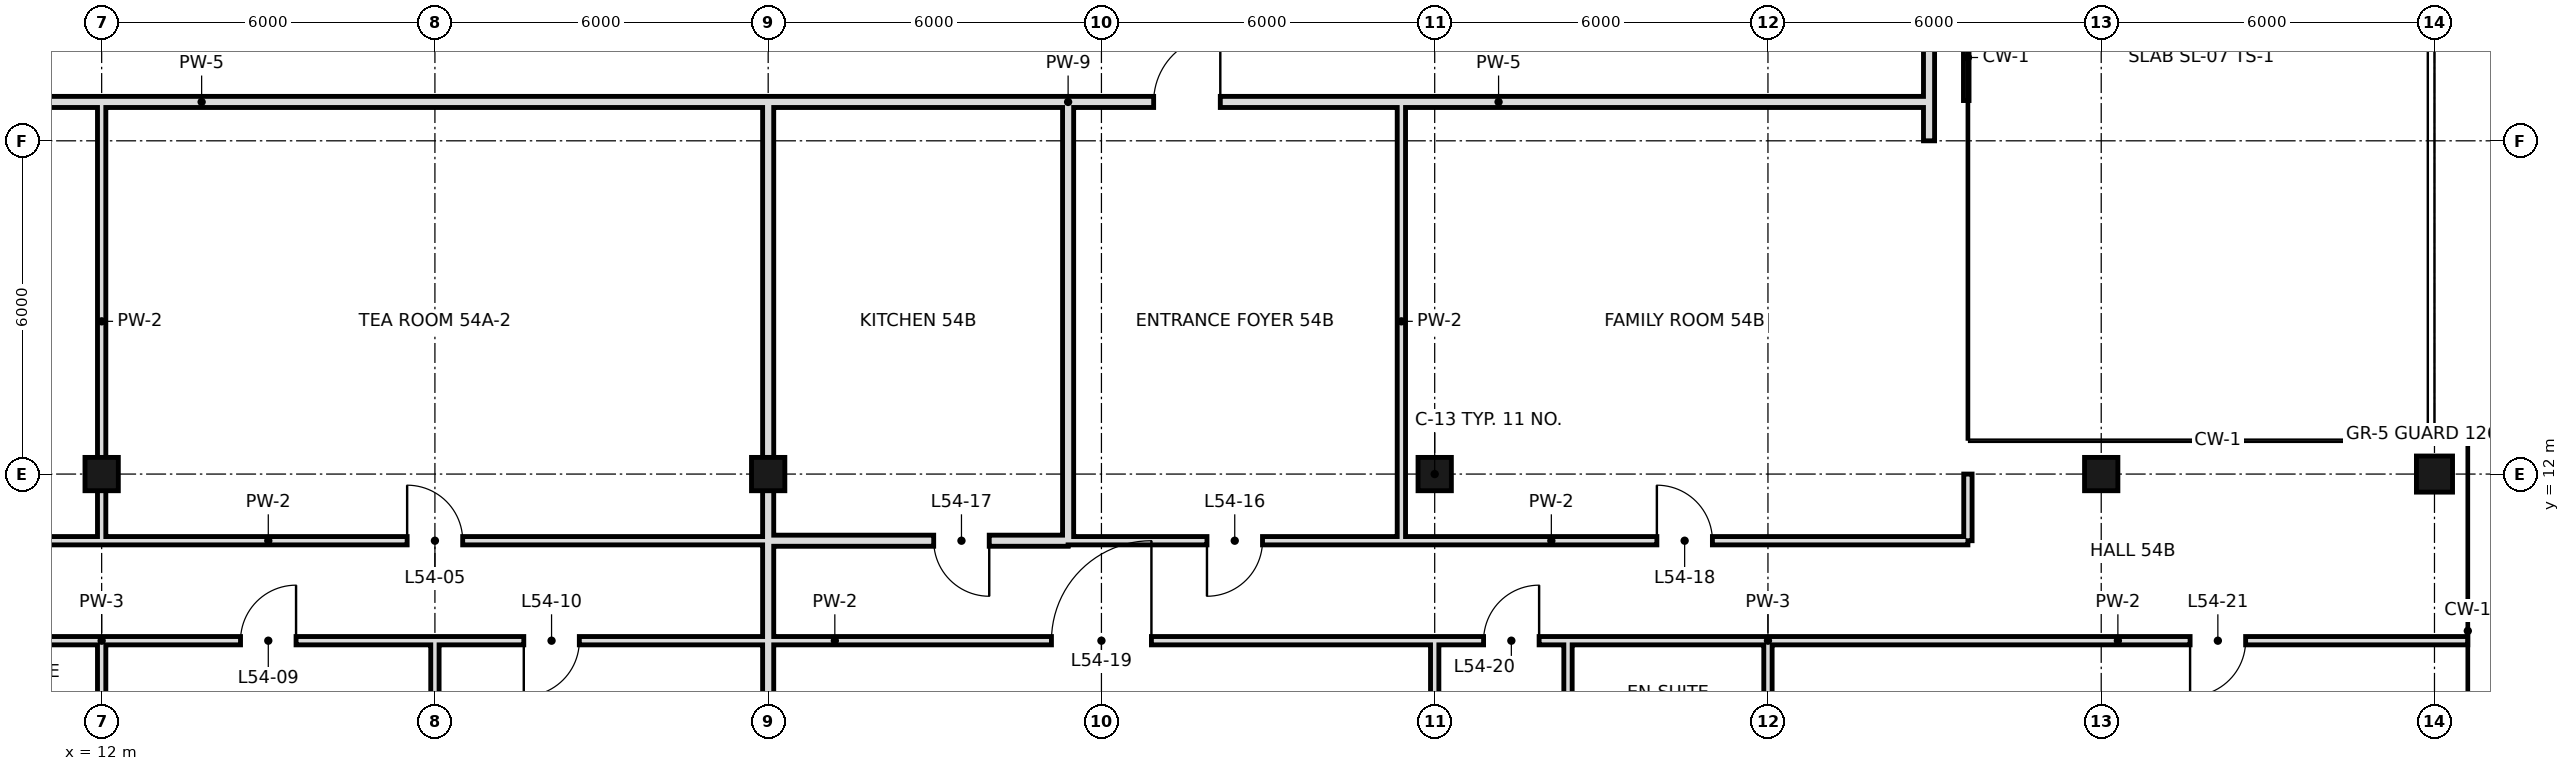
"""IFC4 building model, lengths in metres.
Left out: names, types, materials, properties, quantities, classifications, styles, units other than length and angle.
Written with IfcOpenShell. Run it as: python <this file> out.ifc"""

import sys

from ifc_helpers import new_model, si_unit, direction, frame, frame_2d, origin, origin_2d, place, context, subcontext, project, spatial, rectangle, hollow_rectangle, extrude, element, fill, save


model = new_model("IFC4")
c1 = context("Model", 3, precision=1e-05, world=origin(), true_north=direction((0.0, 1.0)))
c2 = subcontext(c1, "Body", "Model", "MODEL_VIEW")
j1 = project(units=[si_unit("LENGTHUNIT", "METRE"), si_unit("PLANEANGLEUNIT", "RADIAN")], contexts=[c1])
p1 = place(None, origin())
s1 = spatial("IfcSite", under=j1, at=p1, CompositionType="ELEMENT")
p2 = place(p1, origin())
s2 = spatial("IfcBuilding", under=s1, at=p2, CompositionType="ELEMENT")
p3 = place(p2, frame((0.0, 0.0, 229.8)))
s3 = spatial("IfcBuildingStorey", under=s2, at=p3, CompositionType="ELEMENT", Elevation=229.8)
for number, where, z_axis, x_axis in (
    (1, (12.0, 12.0, 0.0), (0.0, 0.0, 1.0), (1.0, 0.0, 0.0)),
    (2, (24.0, 12.0, 0.0), (0.0, 0.0, 1.0), (1.0, 0.0, 0.0)),
    (3, (36.0, 12.0, 0.0), (0.0, 0.0, 1.0), (1.0, 0.0, 0.0)),
    (4, (48.0, 12.0, 0.0), (0.0, 0.0, 1.0), (1.0, 0.0, 0.0)),
):
    element("IfcColumn", number, at=place(p3, frame(where, z_axis=z_axis, x_axis=x_axis)), inside=s3, PredefinedType="COLUMN", context=c2, shape_type="SweptSolid", body=[
        extrude(hollow_rectangle(XDim=0.6, YDim=0.6, WallThickness=0.028, at=origin_2d()), origin(), (0.0, 0.0, 1.0), 4.4),
    ])
p4 = place(p3, frame((54.0, 12.0, 0.0), z_axis=(0.0, 0.0, 1.0), x_axis=(1.0, 0.0, 0.0)))
e5 = element("IfcColumn", 5, at=p4, inside=s3, PredefinedType="COLUMN", context=c2, shape_type="SweptSolid", body=[
    extrude(hollow_rectangle(XDim=0.65, YDim=0.65, WallThickness=0.032, at=origin_2d()), origin(), (0.0, 0.0, 1.0), 4.4),
])
p5 = place(p3, frame((45.57, 18.725, 0.0), z_axis=(0.0, 0.0, 1.0), x_axis=(0.0, 1.0, 0.0)))
e6 = element("IfcWall", 6, at=p5, inside=s3, PredefinedType="SOLIDWALL", context=c2, shape_type="SweptSolid", body=[
    extrude(rectangle(XDim=7.625, YDim=0.1, at=frame_2d((3.812, 0.0))), origin(), (0.0, 0.0, 1.0), 4.1),
])
p6 = place(p5, frame((4.675, 0.0, 0.0)))
e7 = element("IfcOpeningElement", 7, at=p6, cuts=e6, PredefinedType="OPENING", context=c2, shape_type="SweptSolid", body=[
    extrude(rectangle(XDim=2.4, YDim=2.4, at=frame_2d((1.2, 1.2))), frame((0.0, 0.06, 0.0), z_axis=(0.0, -1.0, 0.0), x_axis=(1.0, 0.0, 0.0)), (0.0, 0.0, 1.0), 0.12),
])
p7 = place(p3, frame((12.0, 10.8, 0.0), z_axis=(0.0, 0.0, 1.0), x_axis=(0.0, 1.0, 0.0)))
e8 = element("IfcWall", 8, at=p7, inside=s3, PredefinedType="PARTITIONING", context=c2, shape_type="SweptSolid", body=[
    extrude(rectangle(XDim=7.9, YDim=0.15, at=frame_2d((3.95, 0.0))), origin(), (0.0, 0.0, 1.0), 3.4),
])
p8 = place(p3, frame((12.0, 6.0, 0.0), z_axis=(0.0, 0.0, 1.0), x_axis=(0.0, 1.0, 0.0)))
e9 = element("IfcWall", 9, at=p8, inside=s3, PredefinedType="PARTITIONING", context=c2, shape_type="SweptSolid", body=[
    extrude(rectangle(XDim=3.0, YDim=0.15, at=frame_2d((1.5, 0.0))), origin(), (0.0, 0.0, 1.0), 3.4),
])
p9 = place(p3, frame((18.0, -0.6, 0.0), z_axis=(0.0, 0.0, 1.0), x_axis=(0.0, 1.0, 0.0)))
e10 = element("IfcWall", 10, at=p9, inside=s3, PredefinedType="PARTITIONING", context=c2, shape_type="SweptSolid", body=[
    extrude(rectangle(XDim=9.6, YDim=0.15, at=frame_2d((4.8, 0.0))), origin(), (0.0, 0.0, 1.0), 3.4),
])
p10 = place(p3, frame((24.0, 10.8, 0.0), z_axis=(0.0, 0.0, 1.0), x_axis=(0.0, 1.0, 0.0)))
e11 = element("IfcWall", 11, at=p10, inside=s3, PredefinedType="SOLIDWALL", context=c2, shape_type="SweptSolid", body=[
    extrude(rectangle(XDim=7.9, YDim=0.2, at=frame_2d((3.95, 0.0))), origin(), (0.0, 0.0, 1.0), 3.4),
])
p11 = place(p3, frame((24.0, 0.0, 0.0), z_axis=(0.0, 0.0, 1.0), x_axis=(0.0, 1.0, 0.0)))
e12 = element("IfcWall", 12, at=p11, inside=s3, PredefinedType="SOLIDWALL", context=c2, shape_type="SweptSolid", body=[
    extrude(rectangle(XDim=10.8, YDim=0.2, at=frame_2d((5.4, 0.0))), origin(), (0.0, 0.0, 1.0), 3.4),
])
p12 = place(p3, frame((29.4, 10.8, 0.0), z_axis=(0.0, 0.0, 1.0), x_axis=(0.0, 1.0, 0.0)))
e13 = element("IfcWall", 13, at=p12, inside=s3, PredefinedType="SOLIDWALL", context=c2, shape_type="SweptSolid", body=[
    extrude(rectangle(XDim=7.9, YDim=0.2, at=frame_2d((3.95, 0.0))), origin(), (0.0, 0.0, 1.0), 3.4),
])
p13 = place(p3, frame((35.4, 10.8, 0.0), z_axis=(0.0, 0.0, 1.0), x_axis=(0.0, 1.0, 0.0)))
e14 = element("IfcWall", 14, at=p13, inside=s3, PredefinedType="PARTITIONING", context=c2, shape_type="SweptSolid", body=[
    extrude(rectangle(XDim=7.9, YDim=0.15, at=frame_2d((3.95, 0.0))), origin(), (0.0, 0.0, 1.0), 4.1),
])
p14 = place(p3, frame((36.0, 0.0, 0.0), z_axis=(0.0, 0.0, 1.0), x_axis=(0.0, 1.0, 0.0)))
e15 = element("IfcWall", 15, at=p14, inside=s3, PredefinedType="PARTITIONING", context=c2, shape_type="SweptSolid", body=[
    extrude(rectangle(XDim=9.0, YDim=0.15, at=frame_2d((4.5, 0.0))), origin(), (0.0, 0.0, 1.0), 3.4),
])
p15 = place(p3, frame((38.4, 6.0, 0.0), z_axis=(0.0, 0.0, 1.0), x_axis=(0.0, 1.0, 0.0)))
e16 = element("IfcWall", 16, at=p15, inside=s3, PredefinedType="PARTITIONING", context=c2, shape_type="SweptSolid", body=[
    extrude(rectangle(XDim=3.0, YDim=0.15, at=frame_2d((1.5, 0.0))), origin(), (0.0, 0.0, 1.0), 4.1),
])
p16 = place(p3, frame((42.0, 6.0, 0.0), z_axis=(0.0, 0.0, 1.0), x_axis=(0.0, 1.0, 0.0)))
e17 = element("IfcWall", 17, at=p16, inside=s3, PredefinedType="PARTITIONING", context=c2, shape_type="SweptSolid", body=[
    extrude(rectangle(XDim=3.0, YDim=0.15, at=frame_2d((1.5, 0.0))), origin(), (0.0, 0.0, 1.0), 3.4),
])
p17 = place(p3, frame((44.9, 18.0, 0.0), z_axis=(0.0, 0.0, 1.0), x_axis=(0.0, 1.0, 0.0)))
e18 = element("IfcWall", 18, at=p17, inside=s3, PredefinedType="SOLIDWALL", context=c2, shape_type="SweptSolid", body=[
    extrude(rectangle(XDim=30.6, YDim=0.2, at=frame_2d((15.3, 0.0))), origin(), (0.0, 0.0, 1.0), 3.4),
])
p18 = place(p17, frame((20.27, 0.0, 0.0)))
e19 = element("IfcOpeningElement", 19, at=p18, cuts=e18, PredefinedType="OPENING", context=c2, shape_type="SweptSolid", body=[
    extrude(rectangle(XDim=1.2, YDim=2.4, at=frame_2d((0.6, 1.2))), frame((0.0, 0.11, 0.0), z_axis=(0.0, -1.0, 0.0), x_axis=(1.0, 0.0, 0.0)), (0.0, 0.0, 1.0), 0.22),
])
p19 = place(p3, frame((45.6, 10.8, 0.0), z_axis=(0.0, 0.0, 1.0), x_axis=(0.0, 1.0, 0.0)))
e20 = element("IfcWall", 20, at=p19, inside=s3, PredefinedType="PARTITIONING", context=c2, shape_type="SweptSolid", body=[
    extrude(rectangle(XDim=1.2, YDim=0.15, at=frame_2d((0.6, 0.0))), origin(), (0.0, 0.0, 1.0), 4.1),
])
p20 = place(p3, frame((24.0, 10.8, 0.0), z_axis=(0.0, 0.0, 1.0), x_axis=(1.0, 0.0, 0.0)))
e21 = element("IfcWall", 21, at=p20, inside=s3, PredefinedType="SOLIDWALL", context=c2, shape_type="SweptSolid", body=[
    extrude(rectangle(XDim=5.4, YDim=0.2, at=frame_2d((2.7, 0.0))), origin(), (0.0, 0.0, 1.0), 3.4),
])
p21 = place(p20, frame((2.98, 0.0, 0.0)))
e22 = element("IfcOpeningElement", 22, at=p21, cuts=e21, PredefinedType="OPENING", context=c2, shape_type="SweptSolid", body=[
    extrude(rectangle(XDim=1.0, YDim=2.4, at=frame_2d((0.5, 1.2))), frame((0.0, 0.11, 0.0), z_axis=(0.0, -1.0, 0.0), x_axis=(1.0, 0.0, 0.0)), (0.0, 0.0, 1.0), 0.22),
])
p22 = place(p3, frame((6.0, 10.8, 0.0), z_axis=(0.0, 0.0, 1.0), x_axis=(1.0, 0.0, 0.0)))
e23 = element("IfcWall", 23, at=p22, inside=s3, PredefinedType="PARTITIONING", context=c2, shape_type="SweptSolid", body=[
    extrude(rectangle(XDim=18.0, YDim=0.15, at=frame_2d((9.0, 0.0))), origin(), (0.0, 0.0, 1.0), 4.1),
])
p23 = place(p22, frame((2.5, 0.0, 0.0)))
e24 = element("IfcOpeningElement", 24, at=p23, cuts=e23, PredefinedType="OPENING", context=c2, shape_type="SweptSolid", body=[
    extrude(rectangle(XDim=1.0, YDim=2.4, at=frame_2d((0.5, 1.2))), frame((0.0, 0.085, 0.0), z_axis=(0.0, -1.0, 0.0), x_axis=(1.0, 0.0, 0.0)), (0.0, 0.0, 1.0), 0.17),
])
p24 = place(p22, frame((11.5, 0.0, 0.0)))
e25 = element("IfcOpeningElement", 25, at=p24, cuts=e23, PredefinedType="OPENING", context=c2, shape_type="SweptSolid", body=[
    extrude(rectangle(XDim=1.0, YDim=2.4, at=frame_2d((0.5, 1.2))), frame((0.0, 0.085, 0.0), z_axis=(0.0, -1.0, 0.0), x_axis=(1.0, 0.0, 0.0)), (0.0, 0.0, 1.0), 0.17),
])
p25 = place(p3, frame((29.4, 10.8, 0.0), z_axis=(0.0, 0.0, 1.0), x_axis=(1.0, 0.0, 0.0)))
e26 = element("IfcWall", 26, at=p25, inside=s3, PredefinedType="PARTITIONING", context=c2, shape_type="SweptSolid", body=[
    extrude(rectangle(XDim=16.2, YDim=0.15, at=frame_2d((8.1, 0.0))), origin(), (0.0, 0.0, 1.0), 4.1),
])
p26 = place(p25, frame((2.5, 0.0, 0.0)))
e27 = element("IfcOpeningElement", 27, at=p26, cuts=e26, PredefinedType="OPENING", context=c2, shape_type="SweptSolid", body=[
    extrude(rectangle(XDim=1.0, YDim=2.4, at=frame_2d((0.5, 1.2))), frame((0.0, 0.085, 0.0), z_axis=(0.0, -1.0, 0.0), x_axis=(1.0, 0.0, 0.0)), (0.0, 0.0, 1.0), 0.17),
])
p27 = place(p25, frame((10.6, 0.0, 0.0)))
e28 = element("IfcOpeningElement", 28, at=p27, cuts=e26, PredefinedType="OPENING", context=c2, shape_type="SweptSolid", body=[
    extrude(rectangle(XDim=1.0, YDim=2.4, at=frame_2d((0.5, 1.2))), frame((0.0, 0.085, 0.0), z_axis=(0.0, -1.0, 0.0), x_axis=(1.0, 0.0, 0.0)), (0.0, 0.0, 1.0), 0.17),
])
p28 = place(p3, frame((3.6, 18.7, 0.0), z_axis=(0.0, 0.0, 1.0), x_axis=(1.0, 0.0, 0.0)))
e29 = element("IfcWall", 29, at=p28, inside=s3, PredefinedType="SOLIDWALL", context=c2, shape_type="SweptSolid", body=[
    extrude(rectangle(XDim=20.4, YDim=0.2, at=frame_2d((10.2, 0.0))), origin(), (0.0, 0.0, 1.0), 3.4),
])
p29 = place(p28, frame((4.8, 0.0, 0.0)))
e30 = element("IfcOpeningElement", 30, at=p29, cuts=e29, PredefinedType="OPENING", context=c2, shape_type="SweptSolid", body=[
    extrude(rectangle(XDim=1.2, YDim=2.4, at=frame_2d((0.6, 1.2))), frame((0.0, 0.11, 0.0), z_axis=(0.0, -1.0, 0.0), x_axis=(1.0, 0.0, 0.0)), (0.0, 0.0, 1.0), 0.22),
])
p30 = place(p3, frame((29.4, 18.7, 0.0), z_axis=(0.0, 0.0, 1.0), x_axis=(1.0, 0.0, 0.0)))
e31 = element("IfcWall", 31, at=p30, inside=s3, PredefinedType="SOLIDWALL", context=c2, shape_type="SweptSolid", body=[
    extrude(rectangle(XDim=15.5, YDim=0.2, at=frame_2d((7.75, 0.0))), origin(), (0.0, 0.0, 1.0), 3.4),
])
p31 = place(p30, frame((1.54, 0.0, 0.0)))
e32 = element("IfcOpeningElement", 32, at=p31, cuts=e31, PredefinedType="OPENING", context=c2, shape_type="SweptSolid", body=[
    extrude(rectangle(XDim=1.2, YDim=2.4, at=frame_2d((0.6, 1.2))), frame((0.0, 0.11, 0.0), z_axis=(0.0, -1.0, 0.0), x_axis=(1.0, 0.0, 0.0)), (0.0, 0.0, 1.0), 0.22),
])
p32 = place(p3, frame((24.0, 18.7, 0.0), z_axis=(0.0, 0.0, 1.0), x_axis=(1.0, 0.0, 0.0)))
e33 = element("IfcWall", 33, at=p32, inside=s3, PredefinedType="SOLIDWALL", context=c2, shape_type="SweptSolid", body=[
    extrude(rectangle(XDim=5.4, YDim=0.2, at=frame_2d((2.7, 0.0))), origin(), (0.0, 0.0, 1.0), 4.1),
])
p33 = place(p3, frame((12.0, 9.0, 0.0), z_axis=(0.0, 0.0, 1.0), x_axis=(1.0, 0.0, 0.0)))
e34 = element("IfcWall", 34, at=p33, inside=s3, PredefinedType="PARTITIONING", context=c2, shape_type="SweptSolid", body=[
    extrude(rectangle(XDim=26.4, YDim=0.15, at=frame_2d((13.2, 0.0))), origin(), (0.0, 0.0, 1.0), 4.1),
])
p34 = place(p33, frame((2.5, 0.0, 0.0)))
e35 = element("IfcOpeningElement", 35, at=p34, cuts=e34, PredefinedType="OPENING", context=c2, shape_type="SweptSolid", body=[
    extrude(rectangle(XDim=1.0, YDim=2.4, at=frame_2d((0.5, 1.2))), frame((0.0, 0.085, 0.0), z_axis=(0.0, -1.0, 0.0), x_axis=(1.0, 0.0, 0.0)), (0.0, 0.0, 1.0), 0.17),
])
p35 = place(p33, frame((7.6, 0.0, 0.0)))
e36 = element("IfcOpeningElement", 36, at=p35, cuts=e34, PredefinedType="OPENING", context=c2, shape_type="SweptSolid", body=[
    extrude(rectangle(XDim=1.0, YDim=2.4, at=frame_2d((0.5, 1.2))), frame((0.0, 0.085, 0.0), z_axis=(0.0, -1.0, 0.0), x_axis=(1.0, 0.0, 0.0)), (0.0, 0.0, 1.0), 0.17),
])
p36 = place(p33, frame((17.1, 0.0, 0.0)))
e37 = element("IfcOpeningElement", 37, at=p36, cuts=e34, PredefinedType="OPENING", context=c2, shape_type="SweptSolid", body=[
    extrude(rectangle(XDim=1.8, YDim=2.4, at=frame_2d((0.9, 1.2))), frame((0.0, 0.085, 0.0), z_axis=(0.0, -1.0, 0.0), x_axis=(1.0, 0.0, 0.0)), (0.0, 0.0, 1.0), 0.17),
])
p37 = place(p33, frame((24.88, 0.0, 0.0)))
e38 = element("IfcOpeningElement", 38, at=p37, cuts=e34, PredefinedType="OPENING", context=c2, shape_type="SweptSolid", body=[
    extrude(rectangle(XDim=1.0, YDim=2.4, at=frame_2d((0.5, 1.2))), frame((0.0, 0.085, 0.0), z_axis=(0.0, -1.0, 0.0), x_axis=(1.0, 0.0, 0.0)), (0.0, 0.0, 1.0), 0.17),
])
p38 = place(p3, frame((42.0, 9.0, 0.0), z_axis=(0.0, 0.0, 1.0), x_axis=(1.0, 0.0, 0.0)))
e39 = element("IfcWall", 39, at=p38, inside=s3, PredefinedType="PARTITIONING", context=c2, shape_type="SweptSolid", body=[
    extrude(rectangle(XDim=12.6, YDim=0.15, at=frame_2d((6.3, 0.0))), origin(), (0.0, 0.0, 1.0), 4.1),
])
p39 = place(p38, frame((7.6, 0.0, 0.0)))
e40 = element("IfcOpeningElement", 40, at=p39, cuts=e39, PredefinedType="OPENING", context=c2, shape_type="SweptSolid", body=[
    extrude(rectangle(XDim=1.0, YDim=2.4, at=frame_2d((0.5, 1.2))), frame((0.0, 0.085, 0.0), z_axis=(0.0, -1.0, 0.0), x_axis=(1.0, 0.0, 0.0)), (0.0, 0.0, 1.0), 0.17),
])
p40 = place(p3, frame((9.0, 9.0, 0.0), z_axis=(0.0, 0.0, 1.0), x_axis=(1.0, 0.0, 0.0)))
e41 = element("IfcWall", 41, at=p40, inside=s3, PredefinedType="PARTITIONING", context=c2, shape_type="SweptSolid", body=[
    extrude(rectangle(XDim=3.0, YDim=0.15, at=frame_2d((1.5, 0.0))), origin(), (0.0, 0.0, 1.0), 4.1),
])
p41 = place(p3, frame((38.4, 9.0, 0.0), z_axis=(0.0, 0.0, 1.0), x_axis=(1.0, 0.0, 0.0)))
e42 = element("IfcWall", 42, at=p41, inside=s3, PredefinedType="PARTITIONING", context=c2, shape_type="SweptSolid", body=[
    extrude(rectangle(XDim=3.6, YDim=0.15, at=frame_2d((1.8, 0.0))), origin(), (0.0, 0.0, 1.0), 4.1),
])
p42 = place(p24, origin())
e43 = element("IfcDoor", 43, at=p42, inside=s3, OperationType="SINGLE_SWING_LEFT", PredefinedType="DOOR", context=c2, shape_type="SweptSolid", body=[
    extrude(rectangle(XDim=1.0, YDim=2.4, at=frame_2d((0.5, 1.2))), frame((0.0, 0.025, 0.0), z_axis=(0.0, -1.0, 0.0), x_axis=(1.0, 0.0, 0.0)), (0.0, 0.0, 1.0), 0.05),
])
fill(e25, e43)
p43 = place(p34, frame((1.0, 0.0, 0.0), z_axis=(0.0, 0.0, 1.0), x_axis=(-1.0, 0.0, 0.0)))
e44 = element("IfcDoor", 44, at=p43, inside=s3, OperationType="SINGLE_SWING_LEFT", PredefinedType="DOOR", context=c2, shape_type="SweptSolid", body=[
    extrude(rectangle(XDim=1.0, YDim=2.4, at=frame_2d((0.5, 1.2))), frame((0.0, 0.025, 0.0), z_axis=(0.0, -1.0, 0.0), x_axis=(1.0, 0.0, 0.0)), (0.0, 0.0, 1.0), 0.05),
])
fill(e35, e44)
p44 = place(p35, frame((1.0, 0.0, 0.0), z_axis=(0.0, 0.0, 1.0), x_axis=(-1.0, 0.0, 0.0)))
e45 = element("IfcDoor", 45, at=p44, inside=s3, OperationType="SINGLE_SWING_RIGHT", PredefinedType="DOOR", context=c2, shape_type="SweptSolid", body=[
    extrude(rectangle(XDim=1.0, YDim=2.4, at=frame_2d((0.5, 1.2))), frame((0.0, 0.025, 0.0), z_axis=(0.0, -1.0, 0.0), x_axis=(1.0, 0.0, 0.0)), (0.0, 0.0, 1.0), 0.05),
])
fill(e36, e45)
p45 = place(p26, frame((1.0, 0.0, 0.0), z_axis=(0.0, 0.0, 1.0), x_axis=(-1.0, 0.0, 0.0)))
e46 = element("IfcDoor", 46, at=p45, inside=s3, OperationType="SINGLE_SWING_RIGHT", PredefinedType="DOOR", context=c2, shape_type="SweptSolid", body=[
    extrude(rectangle(XDim=1.0, YDim=2.4, at=frame_2d((0.5, 1.2))), frame((0.0, 0.025, 0.0), z_axis=(0.0, -1.0, 0.0), x_axis=(1.0, 0.0, 0.0)), (0.0, 0.0, 1.0), 0.05),
])
fill(e27, e46)
p46 = place(p21, origin())
e47 = element("IfcDoor", 47, at=p46, inside=s3, OperationType="SINGLE_SWING_RIGHT", PredefinedType="DOOR", context=c2, shape_type="SweptSolid", body=[
    extrude(rectangle(XDim=1.0, YDim=2.4, at=frame_2d((0.5, 1.2))), frame((0.0, 0.025, 0.0), z_axis=(0.0, -1.0, 0.0), x_axis=(1.0, 0.0, 0.0)), (0.0, 0.0, 1.0), 0.05),
])
fill(e22, e47)
p47 = place(p27, origin())
e48 = element("IfcDoor", 48, at=p47, inside=s3, OperationType="SINGLE_SWING_LEFT", PredefinedType="DOOR", context=c2, shape_type="SweptSolid", body=[
    extrude(rectangle(XDim=1.0, YDim=2.4, at=frame_2d((0.5, 1.2))), frame((0.0, 0.025, 0.0), z_axis=(0.0, -1.0, 0.0), x_axis=(1.0, 0.0, 0.0)), (0.0, 0.0, 1.0), 0.05),
])
fill(e28, e48)
p48 = place(p36, frame((1.8, 0.0, 0.0), z_axis=(0.0, 0.0, 1.0), x_axis=(-1.0, 0.0, 0.0)))
e49 = element("IfcDoor", 49, at=p48, inside=s3, OperationType="SINGLE_SWING_LEFT", PredefinedType="DOOR", context=c2, shape_type="SweptSolid", body=[
    extrude(rectangle(XDim=1.8, YDim=2.4, at=frame_2d((0.9, 1.2))), frame((0.0, 0.025, 0.0), z_axis=(0.0, -1.0, 0.0), x_axis=(1.0, 0.0, 0.0)), (0.0, 0.0, 1.0), 0.05),
])
fill(e37, e49)
p49 = place(p37, frame((1.0, 0.0, 0.0), z_axis=(0.0, 0.0, 1.0), x_axis=(-1.0, 0.0, 0.0)))
e50 = element("IfcDoor", 50, at=p49, inside=s3, OperationType="SINGLE_SWING_LEFT", PredefinedType="DOOR", context=c2, shape_type="SweptSolid", body=[
    extrude(rectangle(XDim=1.0, YDim=2.4, at=frame_2d((0.5, 1.2))), frame((0.0, 0.025, 0.0), z_axis=(0.0, -1.0, 0.0), x_axis=(1.0, 0.0, 0.0)), (0.0, 0.0, 1.0), 0.05),
])
fill(e38, e50)
p50 = place(p39, frame((1.0, 0.0, 0.0), z_axis=(0.0, 0.0, 1.0), x_axis=(-1.0, 0.0, 0.0)))
e51 = element("IfcDoor", 51, at=p50, inside=s3, OperationType="SINGLE_SWING_RIGHT", PredefinedType="DOOR", context=c2, shape_type="SweptSolid", body=[
    extrude(rectangle(XDim=1.0, YDim=2.4, at=frame_2d((0.5, 1.2))), frame((0.0, 0.025, 0.0), z_axis=(0.0, -1.0, 0.0), x_axis=(1.0, 0.0, 0.0)), (0.0, 0.0, 1.0), 0.05),
])
fill(e40, e51)
p51 = place(p31, frame((1.2, 0.0, 0.0), z_axis=(0.0, 0.0, 1.0), x_axis=(-1.0, 0.0, 0.0)))
e52 = element("IfcDoor", 52, at=p51, inside=s3, OperationType="SINGLE_SWING_LEFT", PredefinedType="DOOR", context=c2, shape_type="SweptSolid", body=[
    extrude(rectangle(XDim=1.2, YDim=2.4, at=frame_2d((0.6, 1.2))), frame((0.0, 0.025, 0.0), z_axis=(0.0, -1.0, 0.0), x_axis=(1.0, 0.0, 0.0)), (0.0, 0.0, 1.0), 0.05),
])
fill(e32, e52)
save(model, sys.argv[1])
